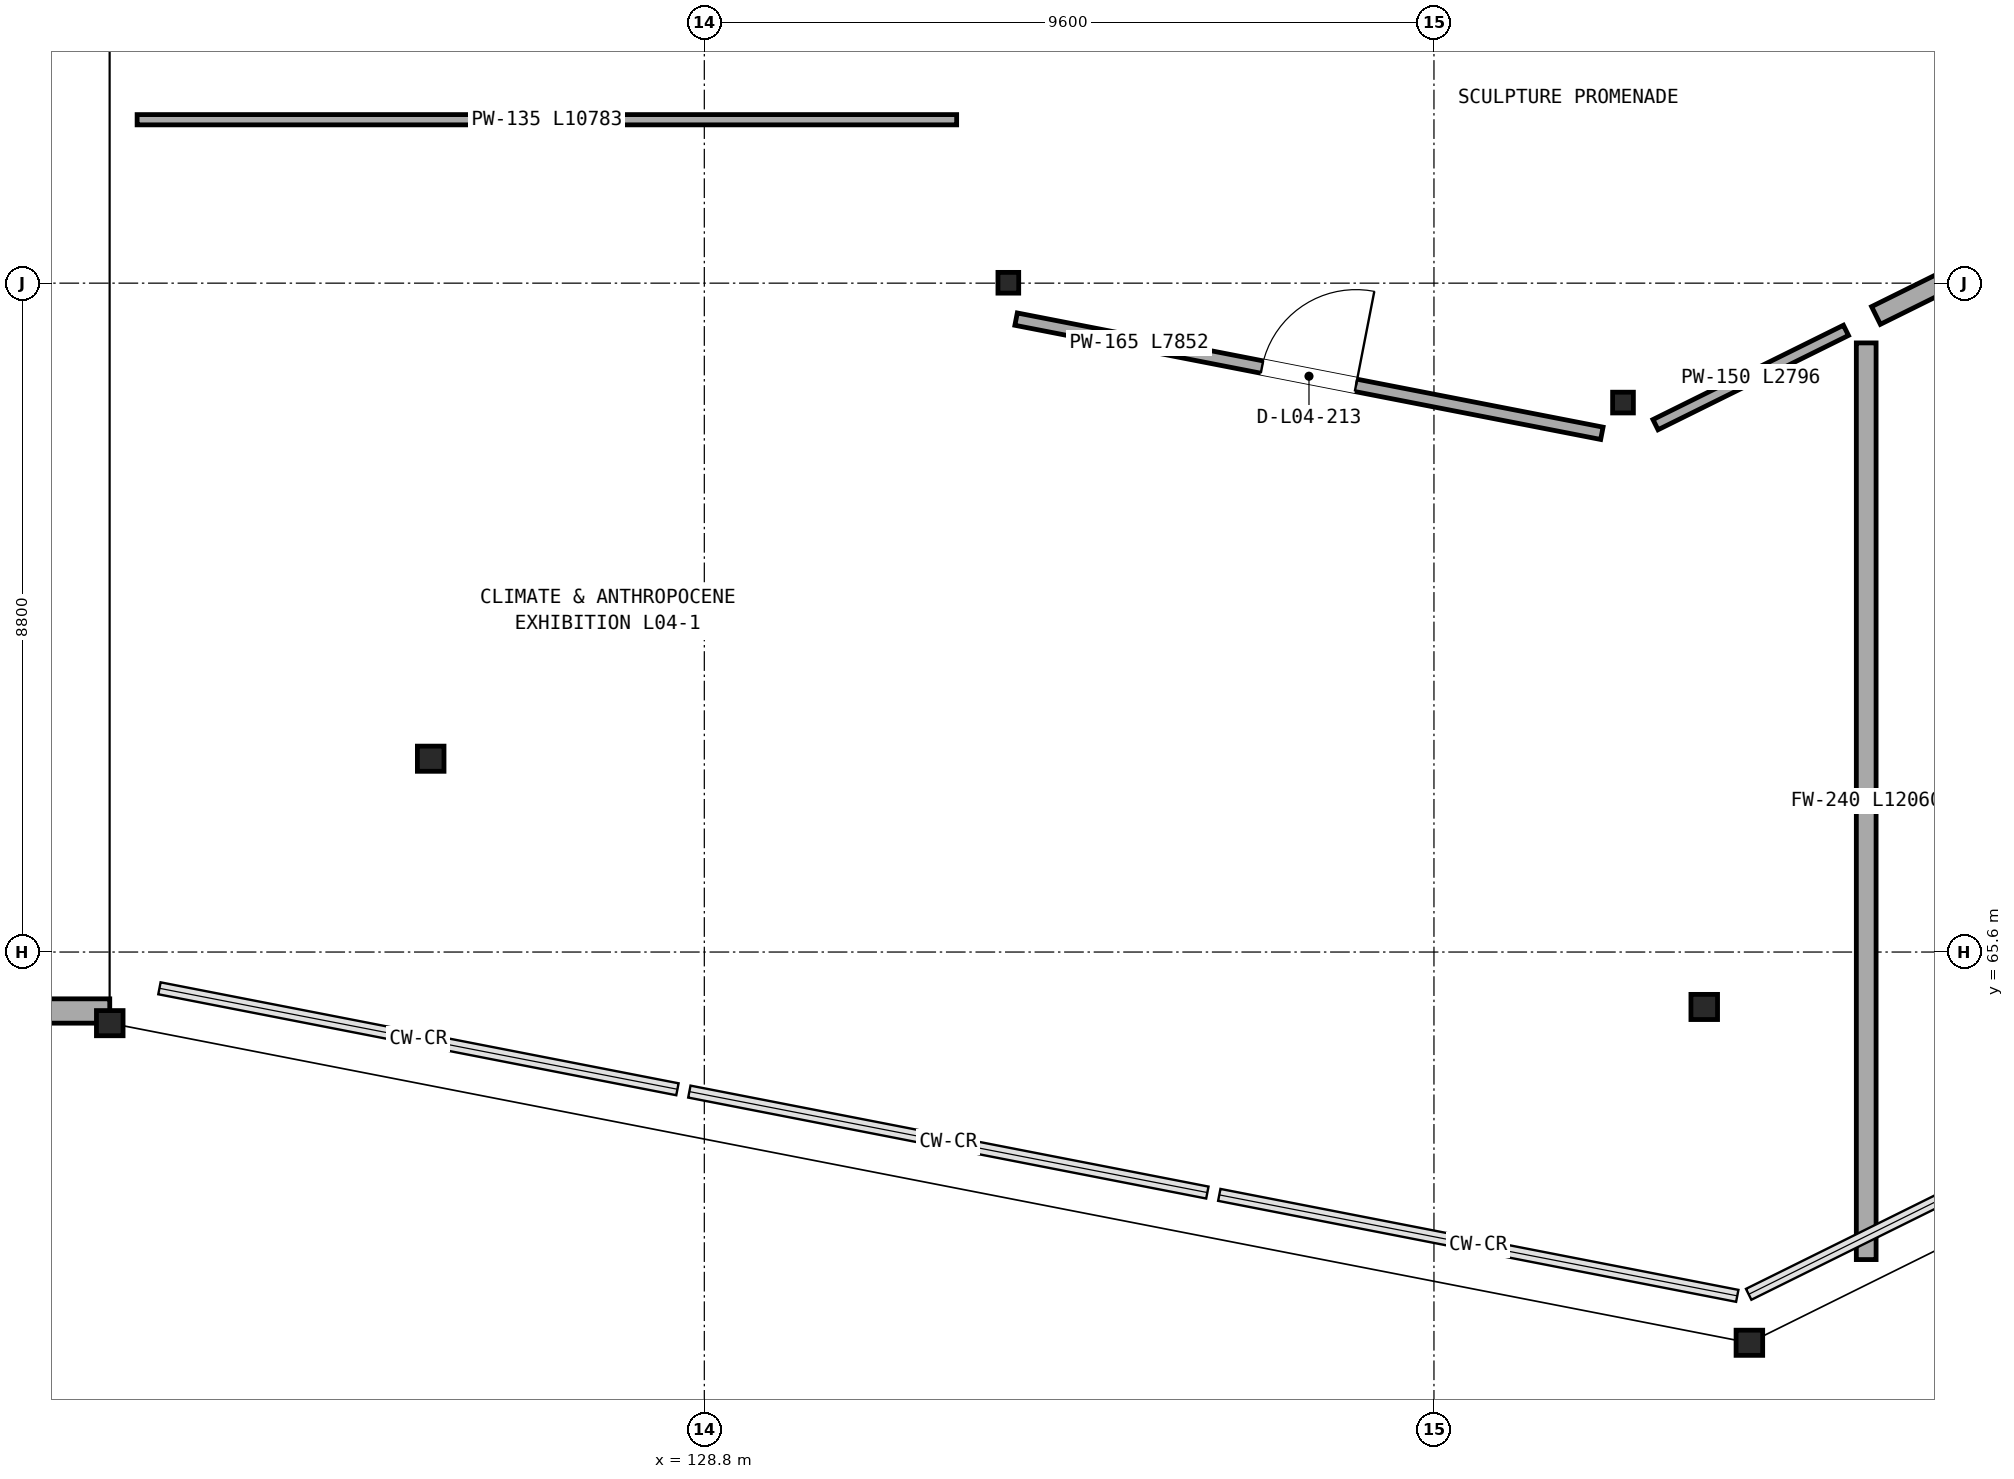
"""IFC4 building model, lengths in metres.
Left out: names, types, materials, properties, quantities, classifications, styles, units other than length and angle.
Written with IfcOpenShell. Run it as: python <this file> out.ifc"""

import sys

from ifc_helpers import new_model, si_unit, direction, frame, frame_2d, origin, origin_2d, place, context, subcontext, project, spatial, rectangle, hollow_circle, i_section, extrude, element, fill, save


model = new_model("IFC4")
c1 = context("Model", 3, precision=1e-05, world=origin(), true_north=direction((0.0, 1.0)))
c2 = subcontext(c1, "Body", "Model", "MODEL_VIEW")
j1 = project(units=[si_unit("LENGTHUNIT", "METRE"), si_unit("PLANEANGLEUNIT", "RADIAN")], contexts=[c1])
p1 = place(None, origin())
s1 = spatial("IfcSite", under=j1, at=p1, CompositionType="ELEMENT")
p2 = place(p1, origin())
s2 = spatial("IfcBuilding", under=s1, at=p2, CompositionType="ELEMENT")
p3 = place(p2, frame((0.0, 0.0, 19.1)))
s3 = spatial("IfcBuildingStorey", under=s2, at=p3, CompositionType="ELEMENT", Elevation=19.1)
p4 = place(p3, frame((120.977, 64.664, 0.0), z_axis=(0.12977150761, 0.106935145051, 0.985760736977), x_axis=(-0.635935760086, 0.771741996424, 0.0)))
e1 = element("IfcColumn", 1, at=p4, inside=s3, PredefinedType="COLUMN", context=c2, shape_type="SweptSolid", body=[
    extrude(i_section(OverallWidth=0.35, OverallDepth=0.331, WebThickness=0.02, FlangeThickness=0.028, at=origin_2d()), origin(), (0.0, 0.0, 1.0), 9.13),
])
p5 = place(p3, frame((125.2, 68.143, 0.0), z_axis=(0.0, 0.0, 1.0), x_axis=(1.0, 0.0, 0.0)))
e2 = element("IfcColumn", 2, at=p5, inside=s3, PredefinedType="COLUMN", context=c2, shape_type="SweptSolid", body=[
    extrude(i_section(OverallWidth=0.35, OverallDepth=0.331, WebThickness=0.02, FlangeThickness=0.028, at=origin_2d()), origin(), (0.0, 0.0, 1.0), 9.0),
])
p6 = place(p3, frame((132.8, 74.405, 0.0), z_axis=(0.0, 0.0, 1.0), x_axis=(1.0, 0.0, 0.0)))
e3 = element("IfcColumn", 3, at=p6, inside=s3, PredefinedType="COLUMN", context=c2, shape_type="SweptSolid", body=[
    extrude(hollow_circle(Radius=0.136, WallThickness=0.009, at=origin_2d()), origin(), (0.0, 0.0, 1.0), 9.0),
])
p7 = place(p3, frame((142.55, 60.459, 0.0), z_axis=(-0.018351152915, 0.136438000737, 0.990478625282), x_axis=(-0.991075543136, -0.133301417086, 0.0)))
e4 = element("IfcColumn", 4, at=p7, inside=s3, PredefinedType="COLUMN", context=c2, shape_type="SweptSolid", body=[
    extrude(i_section(OverallWidth=0.35, OverallDepth=0.331, WebThickness=0.02, FlangeThickness=0.028, at=origin_2d()), origin(), (0.0, 0.0, 1.0), 9.086),
])
p8 = place(p3, frame((141.956, 64.877, 0.0), z_axis=(0.0, 0.0, 1.0), x_axis=(1.0, 0.0, 0.0)))
e5 = element("IfcColumn", 5, at=p8, inside=s3, PredefinedType="COLUMN", context=c2, shape_type="SweptSolid", body=[
    extrude(i_section(OverallWidth=0.35, OverallDepth=0.331, WebThickness=0.02, FlangeThickness=0.028, at=origin_2d()), origin(), (0.0, 0.0, 1.0), 9.0),
])
p9 = place(p3, frame((140.887, 72.829, 0.0), z_axis=(0.0, 0.0, 1.0), x_axis=(1.0, 0.0, 0.0)))
e6 = element("IfcColumn", 6, at=p9, inside=s3, PredefinedType="COLUMN", context=c2, shape_type="SweptSolid", body=[
    extrude(hollow_circle(Radius=0.136, WallThickness=0.009, at=origin_2d()), origin(), (0.0, 0.0, 1.0), 9.0),
])
p10 = place(p3, frame((119.2, 64.824, 0.0), z_axis=(0.0, 0.0, 1.0), x_axis=(1.0, 0.0, 0.0)))
e7 = element("IfcWall", 7, at=p10, inside=s3, PredefinedType="STANDARD", context=c2, shape_type="SweptSolid", body=[
    extrude(rectangle(XDim=1.777, YDim=0.32, at=frame_2d((0.889, 0.0))), origin(), (0.0, 0.0, 1.0), 8.278),
])
p11 = place(p3, frame((132.902, 73.927, 0.0), z_axis=(0.0, 0.0, 1.0), x_axis=(0.98152920164, -0.191312378918, 0.0)))
e8 = element("IfcWall", 8, at=p11, inside=s3, PredefinedType="PARTITIONING", context=c2, shape_type="SweptSolid", body=[
    extrude(rectangle(XDim=7.852, YDim=0.165, at=frame_2d((3.926, 0.0))), origin(), (0.0, 0.0, 1.0), 8.63),
])
p12 = place(p11, frame((3.296, 0.0, 0.0)))
e9 = element("IfcOpeningElement", 9, at=p12, cuts=e8, PredefinedType="OPENING", context=c2, shape_type="SweptSolid", body=[
    extrude(rectangle(XDim=1.26, YDim=2.34, at=frame_2d((0.63, 1.17))), frame((0.0, 0.093, 0.0), z_axis=(0.0, -1.0, 0.0), x_axis=(1.0, 0.0, 0.0)), (0.0, 0.0, 1.0), 0.185),
])
p13 = place(p3, frame((141.315, 72.538, 0.0), z_axis=(0.0, 0.0, 1.0), x_axis=(0.896183793506, 0.443683004247, 0.0)))
e10 = element("IfcWall", 10, at=p13, inside=s3, PredefinedType="PARTITIONING", context=c2, shape_type="SweptSolid", body=[
    extrude(rectangle(XDim=2.796, YDim=0.15, at=frame_2d((1.398, 0.0))), origin(), (0.0, 0.0, 1.0), 8.63),
])
p14 = place(p3, frame((121.337, 76.55, 0.0), z_axis=(0.0, 0.0, 1.0), x_axis=(1.0, 0.0, 0.0)))
e11 = element("IfcWall", 11, at=p14, inside=s3, PredefinedType="PARTITIONING", context=c2, shape_type="SweptSolid", body=[
    extrude(rectangle(XDim=10.783, YDim=0.135, at=frame_2d((5.391, 0.0))), origin(), (0.0, 0.0, 1.0), 8.01),
])
p15 = place(p3, frame((144.216, 73.975, 0.0), z_axis=(0.0, 0.0, 1.0), x_axis=(0.896175791865, 0.443699166186, 0.0)))
e12 = element("IfcWall", 12, at=p15, inside=s3, PredefinedType="SOLIDWALL", context=c2, shape_type="SweptSolid", body=[
    extrude(rectangle(XDim=8.65, YDim=0.26, at=frame_2d((4.325, 0.0))), origin(), (0.0, 0.0, 1.0), 8.63),
])
p16 = place(p3, frame((144.087, 73.614, 0.0), z_axis=(0.0, 0.0, 1.0), x_axis=(0.0, -1.0, 0.0)))
e13 = element("IfcWall", 13, at=p16, inside=s3, PredefinedType="SOLIDWALL", context=c2, shape_type="SweptSolid", body=[
    extrude(rectangle(XDim=12.06, YDim=0.26, at=frame_2d((6.03, 0.0))), origin(), (0.0, 0.0, 1.0), 2.75),
])
p17 = place(p12, origin())
e14 = element("IfcDoor", 14, at=p17, inside=s3, OperationType="SINGLE_SWING_RIGHT", PredefinedType="DOOR", context=c2, shape_type="SweptSolid", body=[
    extrude(rectangle(XDim=1.26, YDim=2.34, at=frame_2d((0.63, 1.17))), frame((0.0, 0.025, 0.0), z_axis=(0.0, -1.0, 0.0), x_axis=(1.0, 0.0, 0.0)), (0.0, 0.0, 1.0), 0.05),
])
fill(e9, e14)
save(model, sys.argv[1])
